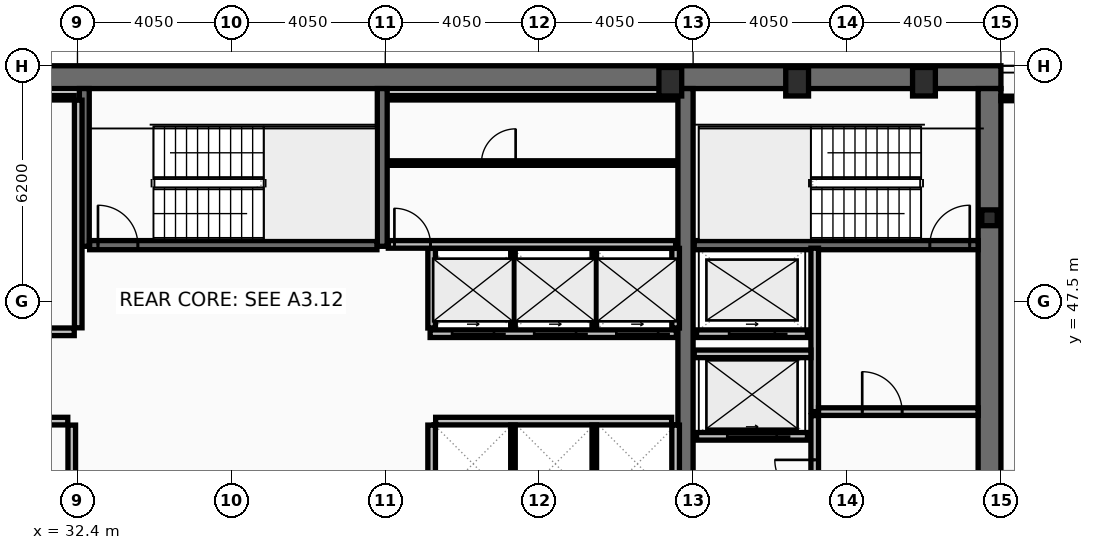
"""IFC4 building model, lengths in metres.
Left out: names, types, materials, properties, quantities, classifications, styles, units other than length and angle.
Written with IfcOpenShell. Run it as: python <this file> out.ifc"""

import sys

from ifc_helpers import new_model, si_unit, direction, frame, frame_2d, origin, origin_2d, place, context, subcontext, project, spatial, rectangle, hollow_rectangle, i_section, extrude, element, fill, save


model = new_model("IFC4")
c1 = context("Model", 3, precision=1e-05, world=origin(), true_north=direction((0.0, 1.0)))
c2 = subcontext(c1, "Body", "Model", "MODEL_VIEW")
j1 = project(units=[si_unit("LENGTHUNIT", "METRE"), si_unit("PLANEANGLEUNIT", "RADIAN")], contexts=[c1])
p1 = place(None, origin())
s1 = spatial("IfcSite", under=j1, at=p1, CompositionType="ELEMENT")
p2 = place(p1, origin())
s2 = spatial("IfcBuilding", under=s1, at=p2, CompositionType="ELEMENT")
p3 = place(p2, frame((0.0, 0.0, 221.0)))
s3 = spatial("IfcBuildingStorey", under=s2, at=p3, CompositionType="ELEMENT", Elevation=221.0)
p4 = place(p3, frame((16.2, 53.4, 0.0), z_axis=(0.0, 0.0, 1.0), x_axis=(1.0, 0.0, 0.0)))
e1 = element("IfcWall", 1, at=p4, inside=s3, PredefinedType="SHEAR", context=c2, shape_type="SweptSolid", body=[
    extrude(rectangle(XDim=40.5, YDim=0.6, at=frame_2d((20.25, 0.0))), origin(), (0.0, 0.0, 1.0), 3.44),
])
p5 = place(p3, frame((56.4, 53.1, 0.0), z_axis=(0.0, 0.0, 1.0), x_axis=(0.0, -1.0, 0.0)))
e2 = element("IfcWall", 2, at=p5, inside=s3, PredefinedType="SHEAR", context=c2, shape_type="SweptSolid", body=[
    extrude(rectangle(XDim=11.2, YDim=0.6, at=frame_2d((5.6, 0.0))), origin(), (0.0, 0.0, 1.0), 3.44),
])
p6 = place(p3, frame((48.4, 41.9, 0.0), z_axis=(0.0, 0.0, 1.0), x_axis=(0.0, 1.0, 0.0)))
e3 = element("IfcWall", 3, at=p6, inside=s3, PredefinedType="SHEAR", context=c2, shape_type="SweptSolid", body=[
    extrude(rectangle(XDim=11.2, YDim=0.4, at=frame_2d((5.6, 0.0))), origin(), (0.0, 0.0, 1.0), 3.44),
])
for number, where, z_axis, x_axis in (
    (4, (32.58, 48.95, 0.0), (0.0, 0.0, 1.0), (0.0, 1.0, 0.0)),
    (5, (40.42, 48.95, 0.0), (0.0, 0.0, 1.0), (0.0, 1.0, 0.0)),
):
    element("IfcWall", number, at=place(p3, frame(where, z_axis=z_axis, x_axis=x_axis)), inside=s3, PredefinedType="SHEAR", context=c2, shape_type="SweptSolid", body=[
        extrude(rectangle(XDim=4.15, YDim=0.26, at=frame_2d((2.075, 0.0))), origin(), (0.0, 0.0, 1.0), 3.44),
    ])
p7 = place(p3, frame((48.63, 48.98, 0.0), z_axis=(0.0, 0.0, 1.0), x_axis=(1.0, 0.0, 0.0)))
e6 = element("IfcWall", 6, at=p7, inside=s3, PredefinedType="SHEAR", context=c2, shape_type="SweptSolid", body=[
    extrude(rectangle(XDim=7.47, YDim=0.24, at=frame_2d((3.735, 0.0))), origin(), (0.0, 0.0, 1.0), 3.44),
])
p8 = place(p7, frame((6.2, 0.0, 0.0)))
e7 = element("IfcOpeningElement", 7, at=p8, cuts=e6, PredefinedType="OPENING", context=c2, shape_type="SweptSolid", body=[
    extrude(rectangle(XDim=1.05, YDim=2.15, at=frame_2d((0.525, 1.075))), frame((0.0, 0.13, 0.0), z_axis=(0.0, -1.0, 0.0), x_axis=(1.0, 0.0, 0.0)), (0.0, 0.0, 1.0), 0.26),
])
p9 = place(p3, frame((32.72, 48.98, 0.0), z_axis=(0.0, 0.0, 1.0), x_axis=(1.0, 0.0, 0.0)))
e8 = element("IfcWall", 8, at=p9, inside=s3, PredefinedType="SHEAR", context=c2, shape_type="SweptSolid", body=[
    extrude(rectangle(XDim=7.56, YDim=0.24, at=frame_2d((3.78, 0.0))), origin(), (0.0, 0.0, 1.0), 3.44),
])
p10 = place(p9, frame((0.22, 0.0, 0.0)))
e9 = element("IfcOpeningElement", 9, at=p10, cuts=e8, PredefinedType="OPENING", context=c2, shape_type="SweptSolid", body=[
    extrude(rectangle(XDim=1.05, YDim=2.15, at=frame_2d((0.525, 1.075))), frame((0.0, 0.13, 0.0), z_axis=(0.0, -1.0, 0.0), x_axis=(1.0, 0.0, 0.0)), (0.0, 0.0, 1.0), 0.26),
])
for number, where, z_axis, x_axis in (
    (10, (48.0, 53.28, 0.0), (0.0, 0.0, 1.0), (1.0, 0.0, 0.0)),
    (11, (51.337, 53.28, 0.0), (0.0, 0.0, 1.0), (1.0, 0.0, 0.0)),
    (12, (54.675, 53.28, 0.0), (0.0, 0.0, 1.0), (1.0, 0.0, 0.0)),
):
    element("IfcColumn", number, at=place(p3, frame(where, z_axis=z_axis, x_axis=x_axis)), inside=s3, PredefinedType="COLUMN", context=c2, shape_type="SweptSolid", body=[
        extrude(hollow_rectangle(XDim=0.6, YDim=0.75, WallThickness=0.045, at=origin_2d()), origin(), (0.0, 0.0, 1.0), 3.6),
    ])
p11 = place(p3, frame((56.4, 49.7, 0.0), z_axis=(0.0, 0.0, 1.0), x_axis=(1.0, 0.0, 0.0)))
e13 = element("IfcColumn", 13, at=p11, inside=s3, PredefinedType="COLUMN", context=c2, shape_type="SweptSolid", body=[
    extrude(i_section(OverallWidth=0.406, OverallDepth=0.416, WebThickness=0.03, FlangeThickness=0.048, at=origin_2d()), origin(), (0.0, 0.0, 1.0), 3.6),
])
p12 = place(p3, frame((51.61, 43.95, 0.0), z_axis=(0.0, 0.0, 1.0), x_axis=(-1.0, 0.0, 0.0)))
e14 = element("IfcWall", 14, at=p12, inside=s3, PredefinedType="PARTITIONING", context=c2, shape_type="SweptSolid", body=[
    extrude(rectangle(XDim=2.92, YDim=0.2, at=frame_2d((1.46, 0.0))), origin(), (0.0, 0.0, 1.0), 3.44),
])
p13 = place(p12, frame((0.81, 0.0, 0.0)))
e15 = element("IfcOpeningElement", 15, at=p13, cuts=e14, PredefinedType="OPENING", context=c2, shape_type="SweptSolid", body=[
    extrude(rectangle(XDim=1.3, YDim=2.18, at=frame_2d((0.65, 1.09))), frame((0.0, 0.11, 0.0), z_axis=(0.0, -1.0, 0.0), x_axis=(1.0, 0.0, 0.0)), (0.0, 0.0, 1.0), 0.22),
])
p14 = place(p3, frame((51.61, 46.65, 0.0), z_axis=(0.0, 0.0, 1.0), x_axis=(-1.0, 0.0, 0.0)))
e16 = element("IfcWall", 16, at=p14, inside=s3, PredefinedType="PARTITIONING", context=c2, shape_type="SweptSolid", body=[
    extrude(rectangle(XDim=2.92, YDim=0.2, at=frame_2d((1.46, 0.0))), origin(), (0.0, 0.0, 1.0), 3.44),
])
p15 = place(p14, frame((0.86, 0.0, 0.0)))
e17 = element("IfcOpeningElement", 17, at=p15, cuts=e16, PredefinedType="OPENING", context=c2, shape_type="SweptSolid", body=[
    extrude(rectangle(XDim=1.2, YDim=2.18, at=frame_2d((0.6, 1.09))), frame((0.0, 0.11, 0.0), z_axis=(0.0, -1.0, 0.0), x_axis=(1.0, 0.0, 0.0)), (0.0, 0.0, 1.0), 0.22),
])
p16 = place(p3, frame((48.16, 46.65, 0.0), z_axis=(0.0, 0.0, 1.0), x_axis=(-1.0, 0.0, 0.0)))
e18 = element("IfcWall", 18, at=p16, inside=s3, PredefinedType="PARTITIONING", context=c2, shape_type="SweptSolid", body=[
    extrude(rectangle(XDim=6.48, YDim=0.2, at=frame_2d((3.24, 0.0))), origin(), (0.0, 0.0, 1.0), 3.44),
])
p17 = place(p16, frame((4.8, 0.0, 0.0)))
e19 = element("IfcOpeningElement", 19, at=p17, cuts=e18, PredefinedType="OPENING", context=c2, shape_type="SweptSolid", body=[
    extrude(rectangle(XDim=1.1, YDim=2.18, at=frame_2d((0.55, 1.09))), frame((0.0, 0.11, 0.0), z_axis=(0.0, -1.0, 0.0), x_axis=(1.0, 0.0, 0.0)), (0.0, 0.0, 1.0), 0.22),
])
p18 = place(p16, frame((2.64, 0.0, 0.0)))
e20 = element("IfcOpeningElement", 20, at=p18, cuts=e18, PredefinedType="OPENING", context=c2, shape_type="SweptSolid", body=[
    extrude(rectangle(XDim=1.1, YDim=2.18, at=frame_2d((0.55, 1.09))), frame((0.0, 0.11, 0.0), z_axis=(0.0, -1.0, 0.0), x_axis=(1.0, 0.0, 0.0)), (0.0, 0.0, 1.0), 0.22),
])
p19 = place(p16, frame((0.48, 0.0, 0.0)))
e21 = element("IfcOpeningElement", 21, at=p19, cuts=e18, PredefinedType="OPENING", context=c2, shape_type="SweptSolid", body=[
    extrude(rectangle(XDim=1.1, YDim=2.18, at=frame_2d((0.55, 1.09))), frame((0.0, 0.11, 0.0), z_axis=(0.0, -1.0, 0.0), x_axis=(1.0, 0.0, 0.0)), (0.0, 0.0, 1.0), 0.22),
])
p20 = place(p3, frame((51.8, 44.6, 0.0), z_axis=(0.0, 0.0, 1.0), x_axis=(0.0, 1.0, 0.0)))
e22 = element("IfcWall", 22, at=p20, inside=s3, PredefinedType="PARTITIONING", context=c2, shape_type="SweptSolid", body=[
    extrude(rectangle(XDim=4.3, YDim=0.2, at=frame_2d((2.15, 0.0))), origin(), (0.0, 0.0, 1.0), 3.44),
])
p21 = place(p3, frame((51.9, 44.6, 0.0), z_axis=(0.0, 0.0, 1.0), x_axis=(1.0, 0.0, 0.0)))
e23 = element("IfcWall", 23, at=p21, inside=s3, PredefinedType="PARTITIONING", context=c2, shape_type="SweptSolid", body=[
    extrude(rectangle(XDim=4.2, YDim=0.2, at=frame_2d((2.1, 0.0))), origin(), (0.0, 0.0, 1.0), 3.44),
])
p22 = place(p21, frame((1.15, 0.0, 0.0)))
e24 = element("IfcOpeningElement", 24, at=p22, cuts=e23, PredefinedType="OPENING", context=c2, shape_type="SweptSolid", body=[
    extrude(rectangle(XDim=1.05, YDim=2.15, at=frame_2d((0.525, 1.075))), frame((0.0, 0.11, 0.0), z_axis=(0.0, -1.0, 0.0), x_axis=(1.0, 0.0, 0.0)), (0.0, 0.0, 1.0), 0.22),
])
p23 = place(p3, frame((48.63, 46.12, 0.0), z_axis=(0.0, 0.0, 1.0), x_axis=(1.0, 0.0, 0.0)))
e25 = element("IfcWall", 25, at=p23, inside=s3, PredefinedType="PARTITIONING", context=c2, shape_type="SweptSolid", body=[
    extrude(rectangle(XDim=3.07, YDim=0.2, at=frame_2d((1.535, 0.0))), origin(), (0.0, 0.0, 1.0), 3.44),
])
p24 = place(p3, frame((51.8, 41.9, 0.0), z_axis=(0.0, 0.0, 1.0), x_axis=(0.0, 1.0, 0.0)))
e26 = element("IfcWall", 26, at=p24, inside=s3, PredefinedType="PARTITIONING", context=c2, shape_type="SweptSolid", body=[
    extrude(rectangle(XDim=2.595, YDim=0.2, at=frame_2d((1.298, 0.0))), origin(), (0.0, 0.0, 1.0), 3.44),
])
p25 = place(p24, frame((0.38, 0.0, 0.0)))
e27 = element("IfcOpeningElement", 27, at=p25, cuts=e26, PredefinedType="OPENING", context=c2, shape_type="SweptSolid", body=[
    extrude(rectangle(XDim=1.05, YDim=2.15, at=frame_2d((0.525, 1.075))), frame((0.0, 0.11, 0.0), z_axis=(0.0, -1.0, 0.0), x_axis=(1.0, 0.0, 0.0)), (0.0, 0.0, 1.0), 0.22),
])
p26 = place(p3, frame((32.42, 46.805, 0.0), z_axis=(0.0, 0.0, 1.0), x_axis=(0.0, 1.0, 0.0)))
e28 = element("IfcWall", 28, at=p26, inside=s3, PredefinedType="PARTITIONING", context=c2, shape_type="SweptSolid", body=[
    extrude(rectangle(XDim=5.99, YDim=0.2, at=frame_2d((2.995, 0.0))), origin(), (0.0, 0.0, 1.0), 3.44),
])
p27 = place(p3, frame((24.805, 52.86, 0.0), z_axis=(0.0, 0.0, 1.0), x_axis=(1.0, 0.0, 0.0)))
e29 = element("IfcWall", 29, at=p27, inside=s3, PredefinedType="PARTITIONING", context=c2, shape_type="SweptSolid", body=[
    extrude(rectangle(XDim=7.51, YDim=0.12, at=frame_2d((3.755, 0.0))), origin(), (0.0, 0.0, 1.0), 3.44),
])
p28 = place(p3, frame((24.805, 46.7, 0.0), z_axis=(0.0, 0.0, 1.0), x_axis=(1.0, 0.0, 0.0)))
e30 = element("IfcWall", 30, at=p28, inside=s3, PredefinedType="PARTITIONING", context=c2, shape_type="SweptSolid", body=[
    extrude(rectangle(XDim=7.51, YDim=0.2, at=frame_2d((3.755, 0.0))), origin(), (0.0, 0.0, 1.0), 3.44),
])
p29 = place(p28, frame((1.15, 0.0, 0.0)))
e31 = element("IfcOpeningElement", 31, at=p29, cuts=e30, PredefinedType="OPENING", context=c2, shape_type="SweptSolid", body=[
    extrude(rectangle(XDim=0.95, YDim=2.1, at=frame_2d((0.475, 1.05))), frame((0.0, 0.11, 0.0), z_axis=(0.0, -1.0, 0.0), x_axis=(1.0, 0.0, 0.0)), (0.0, 0.0, 1.0), 0.22),
])
p30 = place(p28, frame((5.336, 0.0, 0.0)))
e32 = element("IfcOpeningElement", 32, at=p30, cuts=e30, PredefinedType="OPENING", context=c2, shape_type="SweptSolid", body=[
    extrude(rectangle(XDim=0.95, YDim=2.1, at=frame_2d((0.475, 1.05))), frame((0.0, 0.11, 0.0), z_axis=(0.0, -1.0, 0.0), x_axis=(1.0, 0.0, 0.0)), (0.0, 0.0, 1.0), 0.22),
])
p31 = place(p3, frame((32.25, 41.95, 0.0), z_axis=(0.0, 0.0, 1.0), x_axis=(0.0, 1.0, 0.0)))
e33 = element("IfcWall", 33, at=p31, inside=s3, PredefinedType="PARTITIONING", context=c2, shape_type="SweptSolid", body=[
    extrude(rectangle(XDim=2.295, YDim=0.2, at=frame_2d((1.147, 0.0))), origin(), (0.0, 0.0, 1.0), 3.44),
])
p32 = place(p3, frame((24.805, 44.35, 0.0), z_axis=(0.0, 0.0, 1.0), x_axis=(1.0, 0.0, 0.0)))
e34 = element("IfcWall", 34, at=p32, inside=s3, PredefinedType="PARTITIONING", context=c2, shape_type="SweptSolid", body=[
    extrude(rectangle(XDim=7.34, YDim=0.2, at=frame_2d((3.67, 0.0))), origin(), (0.0, 0.0, 1.0), 3.44),
])
p33 = place(p32, frame((1.15, 0.0, 0.0)))
e35 = element("IfcOpeningElement", 35, at=p33, cuts=e34, PredefinedType="OPENING", context=c2, shape_type="SweptSolid", body=[
    extrude(rectangle(XDim=0.95, YDim=2.1, at=frame_2d((0.475, 1.05))), frame((0.0, 0.11, 0.0), z_axis=(0.0, -1.0, 0.0), x_axis=(1.0, 0.0, 0.0)), (0.0, 0.0, 1.0), 0.22),
])
p34 = place(p32, frame((5.231, 0.0, 0.0)))
e36 = element("IfcOpeningElement", 36, at=p34, cuts=e34, PredefinedType="OPENING", context=c2, shape_type="SweptSolid", body=[
    extrude(rectangle(XDim=0.95, YDim=2.1, at=frame_2d((0.475, 1.05))), frame((0.0, 0.11, 0.0), z_axis=(0.0, -1.0, 0.0), x_axis=(1.0, 0.0, 0.0)), (0.0, 0.0, 1.0), 0.22),
])
for number, where, z_axis, x_axis in (
    (37, (41.72, 46.8, 0.0), (0.0, 0.0, 1.0), (0.0, 1.0, 0.0)),
    (38, (48.14, 46.8, 0.0), (0.0, 0.0, 1.0), (0.0, 1.0, 0.0)),
):
    element("IfcWall", number, at=place(p3, frame(where, z_axis=z_axis, x_axis=x_axis)), inside=s3, PredefinedType="PARTITIONING", context=c2, shape_type="SweptSolid", body=[
        extrude(rectangle(XDim=2.095, YDim=0.2, at=frame_2d((1.047, 0.0))), origin(), (0.0, 0.0, 1.0), 3.44),
    ])
for number, where, z_axis, x_axis in (
    (39, (43.86, 46.8, 0.0), (0.0, 0.0, 1.0), (0.0, 1.0, 0.0)),
    (40, (46.0, 46.8, 0.0), (0.0, 0.0, 1.0), (0.0, 1.0, 0.0)),
):
    element("IfcWall", number, at=place(p3, frame(where, z_axis=z_axis, x_axis=x_axis)), inside=s3, PredefinedType="PARTITIONING", context=c2, shape_type="SweptSolid", body=[
        extrude(rectangle(XDim=2.095, YDim=0.12, at=frame_2d((1.047, 0.0))), origin(), (0.0, 0.0, 1.0), 3.44),
    ])
p35 = place(p3, frame((41.825, 44.35, 0.0), z_axis=(0.0, 0.0, 1.0), x_axis=(1.0, 0.0, 0.0)))
e41 = element("IfcWall", 41, at=p35, inside=s3, PredefinedType="PARTITIONING", context=c2, shape_type="SweptSolid", body=[
    extrude(rectangle(XDim=6.21, YDim=0.2, at=frame_2d((3.105, 0.0))), origin(), (0.0, 0.0, 1.0), 3.44),
])
for number, where, z_axis, x_axis in (
    (42, (41.72, 41.95, 0.0), (0.0, 0.0, 1.0), (0.0, 1.0, 0.0)),
    (43, (48.14, 41.95, 0.0), (0.0, 0.0, 1.0), (0.0, 1.0, 0.0)),
):
    element("IfcWall", number, at=place(p3, frame(where, z_axis=z_axis, x_axis=x_axis)), inside=s3, PredefinedType="PARTITIONING", context=c2, shape_type="SweptSolid", body=[
        extrude(rectangle(XDim=2.295, YDim=0.2, at=frame_2d((1.147, 0.0))), origin(), (0.0, 0.0, 1.0), 3.44),
    ])
for number, where, z_axis, x_axis in (
    (44, (43.86, 41.95, 0.0), (0.0, 0.0, 1.0), (0.0, 1.0, 0.0)),
    (45, (46.0, 41.95, 0.0), (0.0, 0.0, 1.0), (0.0, 1.0, 0.0)),
):
    element("IfcWall", number, at=place(p3, frame(where, z_axis=z_axis, x_axis=x_axis)), inside=s3, PredefinedType="PARTITIONING", context=c2, shape_type="SweptSolid", body=[
        extrude(rectangle(XDim=2.295, YDim=0.12, at=frame_2d((1.147, 0.0))), origin(), (0.0, 0.0, 1.0), 3.44),
    ])
p36 = place(p3, frame((40.58, 52.86, 0.0), z_axis=(0.0, 0.0, 1.0), x_axis=(1.0, 0.0, 0.0)))
e46 = element("IfcWall", 46, at=p36, inside=s3, PredefinedType="PARTITIONING", context=c2, shape_type="SweptSolid", body=[
    extrude(rectangle(XDim=7.56, YDim=0.12, at=frame_2d((3.78, 0.0))), origin(), (0.0, 0.0, 1.0), 3.44),
])
p37 = place(p3, frame((40.58, 49.0, 0.0), z_axis=(0.0, 0.0, 1.0), x_axis=(1.0, 0.0, 0.0)))
e47 = element("IfcWall", 47, at=p37, inside=s3, PredefinedType="PARTITIONING", context=c2, shape_type="SweptSolid", body=[
    extrude(rectangle(XDim=7.56, YDim=0.2, at=frame_2d((3.78, 0.0))), origin(), (0.0, 0.0, 1.0), 3.44),
])
p38 = place(p37, frame((0.16, 0.0, 0.0)))
e48 = element("IfcOpeningElement", 48, at=p38, cuts=e47, PredefinedType="OPENING", context=c2, shape_type="SweptSolid", body=[
    extrude(rectangle(XDim=0.95, YDim=2.1, at=frame_2d((0.475, 1.05))), frame((0.0, 0.11, 0.0), z_axis=(0.0, -1.0, 0.0), x_axis=(1.0, 0.0, 0.0)), (0.0, 0.0, 1.0), 0.22),
])
p39 = place(p3, frame((40.63, 51.14, 0.0), z_axis=(0.0, 0.0, 1.0), x_axis=(1.0, 0.0, 0.0)))
e49 = element("IfcWall", 49, at=p39, inside=s3, PredefinedType="PARTITIONING", context=c2, shape_type="SweptSolid", body=[
    extrude(rectangle(XDim=7.46, YDim=0.12, at=frame_2d((3.73, 0.0))), origin(), (0.0, 0.0, 1.0), 3.44),
])
p40 = place(p39, frame((2.4, 0.0, 0.0)))
e50 = element("IfcOpeningElement", 50, at=p40, cuts=e49, PredefinedType="OPENING", context=c2, shape_type="SweptSolid", body=[
    extrude(rectangle(XDim=0.9, YDim=2.05, at=frame_2d((0.45, 1.025))), frame((0.0, 0.07, 0.0), z_axis=(0.0, -1.0, 0.0), x_axis=(1.0, 0.0, 0.0)), (0.0, 0.0, 1.0), 0.14),
])
p41 = place(p3, frame((56.7, 52.84, 0.0), z_axis=(0.0, 0.0, 1.0), x_axis=(1.0, 0.0, 0.0)))
e51 = element("IfcWall", 51, at=p41, inside=s3, PredefinedType="PARTITIONING", context=c2, shape_type="SweptSolid", body=[
    extrude(rectangle(XDim=8.105, YDim=0.12, at=frame_2d((4.052, 0.0))), origin(), (0.0, 0.0, 1.0), 3.44),
])
p42 = place(p8, origin())
e52 = element("IfcDoor", 52, at=p42, inside=s3, OperationType="SINGLE_SWING_RIGHT", PredefinedType="DOOR", context=c2, shape_type="SweptSolid", body=[
    extrude(rectangle(XDim=1.05, YDim=2.15, at=frame_2d((0.525, 1.075))), frame((0.0, 0.025, 0.0), z_axis=(0.0, -1.0, 0.0), x_axis=(1.0, 0.0, 0.0)), (0.0, 0.0, 1.0), 0.05),
])
fill(e7, e52)
p43 = place(p10, origin())
e53 = element("IfcDoor", 53, at=p43, inside=s3, OperationType="SINGLE_SWING_LEFT", PredefinedType="DOOR", context=c2, shape_type="SweptSolid", body=[
    extrude(rectangle(XDim=1.05, YDim=2.15, at=frame_2d((0.525, 1.075))), frame((0.0, 0.025, 0.0), z_axis=(0.0, -1.0, 0.0), x_axis=(1.0, 0.0, 0.0)), (0.0, 0.0, 1.0), 0.05),
])
fill(e9, e53)
p44 = place(p13, origin())
e54 = element("IfcDoor", 54, at=p44, inside=s3, OperationType="SLIDING_TO_LEFT", PredefinedType="DOOR", context=c2, shape_type="SweptSolid", body=[
    extrude(rectangle(XDim=1.3, YDim=2.18, at=frame_2d((0.65, 1.09))), frame((0.0, 0.025, 0.0), z_axis=(0.0, -1.0, 0.0), x_axis=(1.0, 0.0, 0.0)), (0.0, 0.0, 1.0), 0.05),
])
fill(e15, e54)
p45 = place(p15, origin())
e55 = element("IfcDoor", 55, at=p45, inside=s3, OperationType="SLIDING_TO_LEFT", PredefinedType="DOOR", context=c2, shape_type="SweptSolid", body=[
    extrude(rectangle(XDim=1.2, YDim=2.18, at=frame_2d((0.6, 1.09))), frame((0.0, 0.025, 0.0), z_axis=(0.0, -1.0, 0.0), x_axis=(1.0, 0.0, 0.0)), (0.0, 0.0, 1.0), 0.05),
])
fill(e17, e55)
p46 = place(p17, origin())
e56 = element("IfcDoor", 56, at=p46, inside=s3, OperationType="SLIDING_TO_LEFT", PredefinedType="DOOR", context=c2, shape_type="SweptSolid", body=[
    extrude(rectangle(XDim=1.1, YDim=2.18, at=frame_2d((0.55, 1.09))), frame((0.0, 0.025, 0.0), z_axis=(0.0, -1.0, 0.0), x_axis=(1.0, 0.0, 0.0)), (0.0, 0.0, 1.0), 0.05),
])
fill(e19, e56)
p47 = place(p18, origin())
e57 = element("IfcDoor", 57, at=p47, inside=s3, OperationType="SLIDING_TO_LEFT", PredefinedType="DOOR", context=c2, shape_type="SweptSolid", body=[
    extrude(rectangle(XDim=1.1, YDim=2.18, at=frame_2d((0.55, 1.09))), frame((0.0, 0.025, 0.0), z_axis=(0.0, -1.0, 0.0), x_axis=(1.0, 0.0, 0.0)), (0.0, 0.0, 1.0), 0.05),
])
fill(e20, e57)
p48 = place(p19, origin())
e58 = element("IfcDoor", 58, at=p48, inside=s3, OperationType="SLIDING_TO_LEFT", PredefinedType="DOOR", context=c2, shape_type="SweptSolid", body=[
    extrude(rectangle(XDim=1.1, YDim=2.18, at=frame_2d((0.55, 1.09))), frame((0.0, 0.025, 0.0), z_axis=(0.0, -1.0, 0.0), x_axis=(1.0, 0.0, 0.0)), (0.0, 0.0, 1.0), 0.05),
])
fill(e21, e58)
p49 = place(p22, origin())
e59 = element("IfcDoor", 59, at=p49, inside=s3, OperationType="SINGLE_SWING_LEFT", PredefinedType="DOOR", context=c2, shape_type="SweptSolid", body=[
    extrude(rectangle(XDim=1.05, YDim=2.15, at=frame_2d((0.525, 1.075))), frame((0.0, 0.025, 0.0), z_axis=(0.0, -1.0, 0.0), x_axis=(1.0, 0.0, 0.0)), (0.0, 0.0, 1.0), 0.05),
])
fill(e24, e59)
p50 = place(p25, origin())
e60 = element("IfcDoor", 60, at=p50, inside=s3, OperationType="SINGLE_SWING_RIGHT", PredefinedType="DOOR", context=c2, shape_type="SweptSolid", body=[
    extrude(rectangle(XDim=1.05, YDim=2.15, at=frame_2d((0.525, 1.075))), frame((0.0, 0.025, 0.0), z_axis=(0.0, -1.0, 0.0), x_axis=(1.0, 0.0, 0.0)), (0.0, 0.0, 1.0), 0.05),
])
fill(e27, e60)
p51 = place(p38, origin())
e61 = element("IfcDoor", 61, at=p51, inside=s3, OperationType="SINGLE_SWING_LEFT", PredefinedType="DOOR", context=c2, shape_type="SweptSolid", body=[
    extrude(rectangle(XDim=0.95, YDim=2.1, at=frame_2d((0.475, 1.05))), frame((0.0, 0.025, 0.0), z_axis=(0.0, -1.0, 0.0), x_axis=(1.0, 0.0, 0.0)), (0.0, 0.0, 1.0), 0.05),
])
fill(e48, e61)
p52 = place(p40, origin())
e62 = element("IfcDoor", 62, at=p52, inside=s3, OperationType="SINGLE_SWING_RIGHT", PredefinedType="DOOR", context=c2, shape_type="SweptSolid", body=[
    extrude(rectangle(XDim=0.9, YDim=2.05, at=frame_2d((0.45, 1.025))), frame((0.0, 0.025, 0.0), z_axis=(0.0, -1.0, 0.0), x_axis=(1.0, 0.0, 0.0)), (0.0, 0.0, 1.0), 0.05),
])
fill(e50, e62)
save(model, sys.argv[1])
